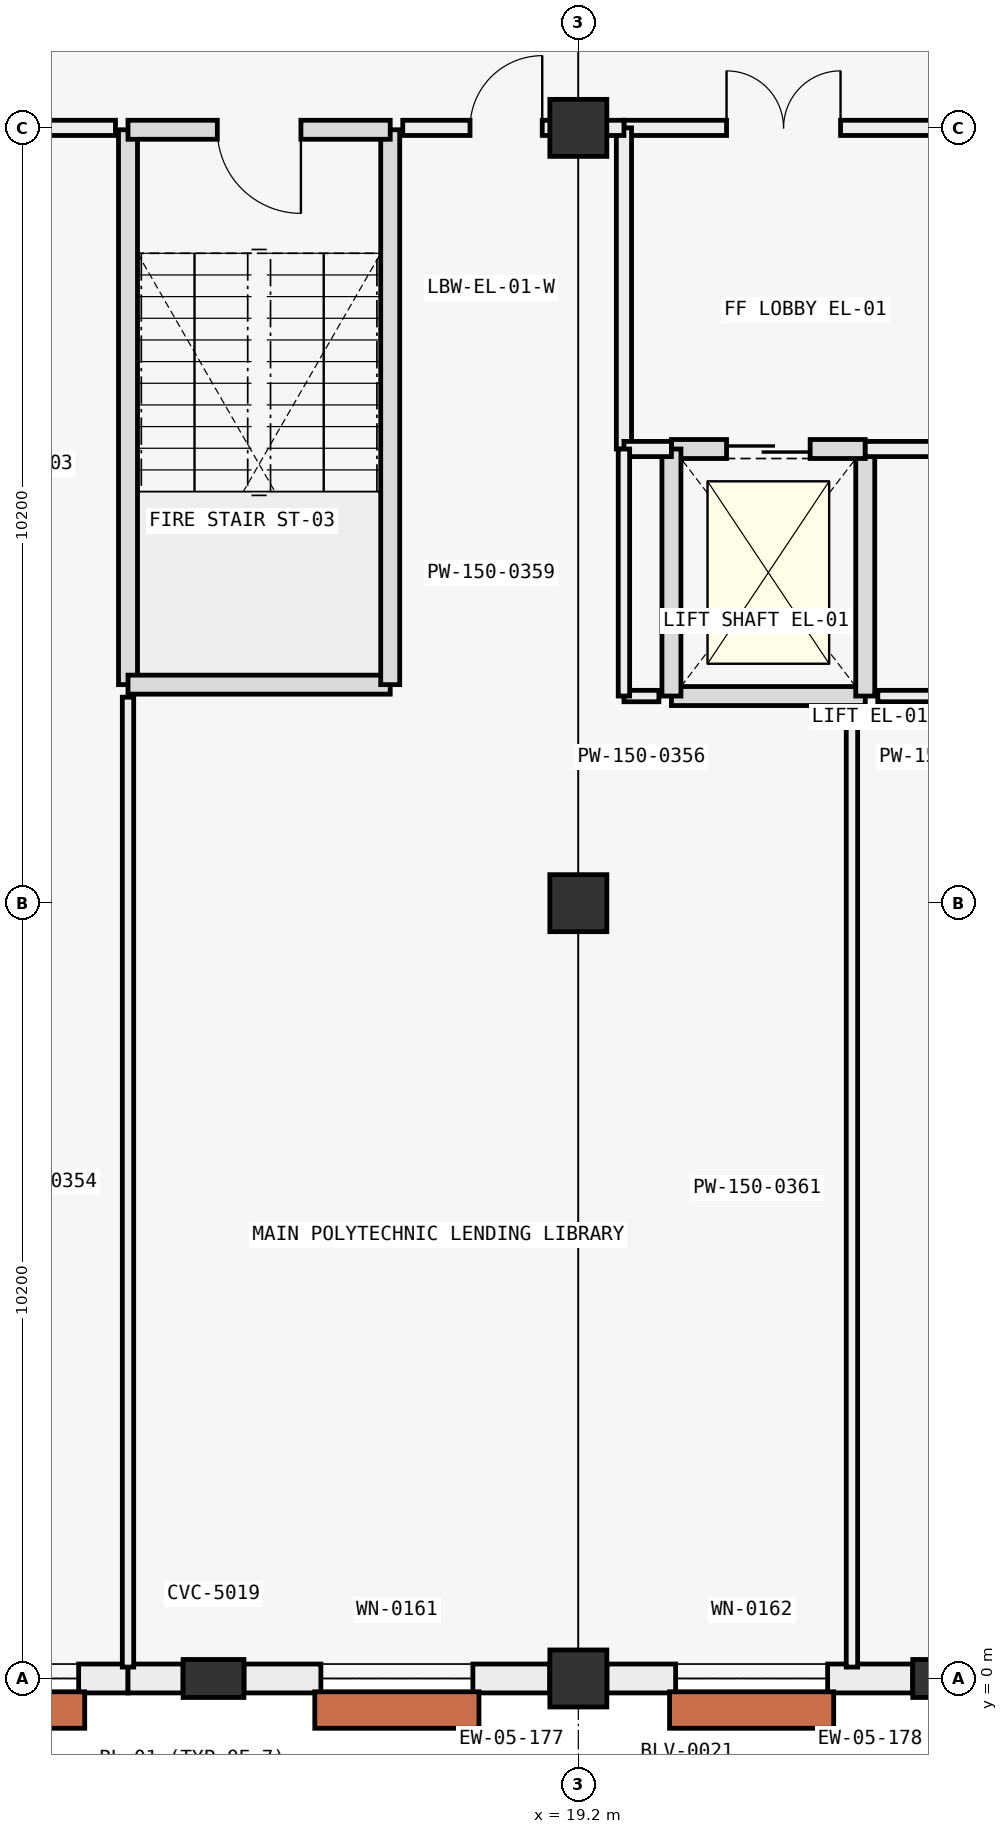
"""IFC4 building model, lengths in metres.
Left out: names, types, materials, properties, quantities, classifications, styles, units other than length and angle.
Written with IfcOpenShell. Run it as: python <this file> out.ifc"""

import sys

from ifc_helpers import new_model, si_unit, direction, frame, frame_2d, origin, origin_2d, place, context, subcontext, project, spatial, rectangle, extrude, element, fill, save


model = new_model("IFC4")
c1 = context("Model", 3, precision=1e-05, world=origin(), true_north=direction((0.0, 1.0)))
c2 = subcontext(c1, "Body", "Model", "MODEL_VIEW")
j1 = project(units=[si_unit("LENGTHUNIT", "METRE"), si_unit("PLANEANGLEUNIT", "RADIAN")], contexts=[c1])
p1 = place(None, origin())
s1 = spatial("IfcSite", under=j1, at=p1, CompositionType="ELEMENT")
p2 = place(p1, origin())
s2 = spatial("IfcBuilding", under=s1, at=p2, CompositionType="ELEMENT")
p3 = place(p2, frame((0.0, 0.0, 5.4)))
s3 = spatial("IfcBuildingStorey", under=s2, at=p3, CompositionType="ELEMENT", Elevation=5.4)
for number, where, z_axis, x_axis in (
    (1, (19.2, 0.0, 0.0), (0.0, 0.0, 1.0), (1.0, 0.0, 0.0)),
    (2, (19.2, 10.2, 0.0), (0.0, 0.0, 1.0), (1.0, 0.0, 0.0)),
    (3, (19.2, 20.4, 0.0), (0.0, 0.0, 1.0), (1.0, 0.0, 0.0)),
):
    element("IfcColumn", number, at=place(p3, frame(where, z_axis=z_axis, x_axis=x_axis)), inside=s3, PredefinedType="COLUMN", context=c2, shape_type="SweptSolid", body=[
        extrude(rectangle(XDim=0.75, YDim=0.75, at=origin_2d()), origin(), (0.0, 0.0, 1.0), 4.2),
    ])
for number, where, z_axis, x_axis in (
    (4, (14.4, 0.0, 0.0), (0.0, 0.0, 1.0), (0.0, 1.0, 0.0)),
    (5, (24.0, 0.0, 0.0), (0.0, 0.0, 1.0), (0.0, 1.0, 0.0)),
):
    element("IfcColumn", number, at=place(p3, frame(where, z_axis=z_axis, x_axis=x_axis)), inside=s3, PredefinedType="PILASTER", context=c2, shape_type="SweptSolid", body=[
        extrude(rectangle(XDim=0.5, YDim=0.8, at=origin_2d()), origin(), (0.0, 0.0, 1.0), 4.2),
    ])
p4 = place(p3, frame((13.275, 0.0, 0.0), z_axis=(0.0, 0.0, 1.0), x_axis=(-1.0, 0.0, 0.0)))
e6 = element("IfcWall", 6, at=p4, inside=s3, PredefinedType="SOLIDWALL", context=c2, shape_type="SweptSolid", body=[
    extrude(rectangle(XDim=3.299, YDim=0.38, at=frame_2d((1.649, 0.0))), origin(), (0.0, 0.0, 1.0), 3.25),
])
p5 = place(p4, frame((0.649, 0.0, 0.8)))
e7 = element("IfcOpeningElement", 7, at=p5, cuts=e6, PredefinedType="OPENING", context=c2, shape_type="SweptSolid", body=[
    extrude(rectangle(XDim=2.0, YDim=1.35, at=frame_2d((1.0, 0.675))), frame((0.0, 0.2, 0.0), z_axis=(0.0, -1.0, 0.0), x_axis=(1.0, 0.0, 0.0)), (0.0, 0.0, 1.0), 0.4),
])
p6 = place(p3, frame((13.999, 0.0, 0.0), z_axis=(0.0, 0.0, 1.0), x_axis=(-1.0, 0.0, 0.0)))
e8 = element("IfcWall", 8, at=p6, inside=s3, PredefinedType="SOLIDWALL", context=c2, shape_type="SweptSolid", body=[
    extrude(rectangle(XDim=0.724, YDim=0.38, at=frame_2d((0.362, 0.0))), origin(), (0.0, 0.0, 1.0), 3.25),
])
p7 = place(p3, frame((18.824, 0.0, 0.0), z_axis=(0.0, 0.0, 1.0), x_axis=(-1.0, 0.0, 0.0)))
e9 = element("IfcWall", 9, at=p7, inside=s3, PredefinedType="SOLIDWALL", context=c2, shape_type="SweptSolid", body=[
    extrude(rectangle(XDim=4.023, YDim=0.38, at=frame_2d((2.011, 0.0))), origin(), (0.0, 0.0, 1.0), 3.25),
])
p8 = place(p7, frame((1.011, 0.0, 0.8)))
e10 = element("IfcOpeningElement", 10, at=p8, cuts=e9, PredefinedType="OPENING", context=c2, shape_type="SweptSolid", body=[
    extrude(rectangle(XDim=2.0, YDim=1.35, at=frame_2d((1.0, 0.675))), frame((0.0, 0.2, 0.0), z_axis=(0.0, -1.0, 0.0), x_axis=(1.0, 0.0, 0.0)), (0.0, 0.0, 1.0), 0.4),
])
p9 = place(p3, frame((23.599, 0.0, 0.0), z_axis=(0.0, 0.0, 1.0), x_axis=(-1.0, 0.0, 0.0)))
e11 = element("IfcWall", 11, at=p9, inside=s3, PredefinedType="SOLIDWALL", context=c2, shape_type="SweptSolid", body=[
    extrude(rectangle(XDim=4.023, YDim=0.38, at=frame_2d((2.012, 0.0))), origin(), (0.0, 0.0, 1.0), 3.25),
])
p10 = place(p9, frame((1.119, 0.0, 0.8)))
e12 = element("IfcOpeningElement", 12, at=p10, cuts=e11, PredefinedType="OPENING", context=c2, shape_type="SweptSolid", body=[
    extrude(rectangle(XDim=2.0, YDim=1.35, at=frame_2d((1.0, 0.675))), frame((0.0, 0.2, 0.0), z_axis=(0.0, -1.0, 0.0), x_axis=(1.0, 0.0, 0.0)), (0.0, 0.0, 1.0), 0.4),
])
p11 = place(p3, frame((13.275, 20.375, 0.0), z_axis=(0.0, 0.0, 1.0), x_axis=(0.0, -1.0, 0.0)))
e13 = element("IfcWall", 13, at=p11, inside=s3, PredefinedType="SOLIDWALL", context=c2, shape_type="SweptSolid", body=[
    extrude(rectangle(XDim=7.3, YDim=0.25, at=frame_2d((3.65, 0.0))), origin(), (0.0, 0.0, 1.0), 3.92),
])
p12 = place(p3, frame((13.275, 13.075, 0.0), z_axis=(0.0, 0.0, 1.0), x_axis=(1.0, 0.0, 0.0)))
e14 = element("IfcWall", 14, at=p12, inside=s3, PredefinedType="SOLIDWALL", context=c2, shape_type="SweptSolid", body=[
    extrude(rectangle(XDim=3.45, YDim=0.25, at=frame_2d((1.725, 0.0))), origin(), (0.0, 0.0, 1.0), 3.92),
])
p13 = place(p3, frame((16.725, 13.075, 0.0), z_axis=(0.0, 0.0, 1.0), x_axis=(0.0, 1.0, 0.0)))
e15 = element("IfcWall", 15, at=p13, inside=s3, PredefinedType="SOLIDWALL", context=c2, shape_type="SweptSolid", body=[
    extrude(rectangle(XDim=7.3, YDim=0.25, at=frame_2d((3.65, 0.0))), origin(), (0.0, 0.0, 1.0), 3.92),
])
p14 = place(p3, frame((16.725, 20.375, 0.0), z_axis=(0.0, 0.0, 1.0), x_axis=(-1.0, 0.0, 0.0)))
e16 = element("IfcWall", 16, at=p14, inside=s3, PredefinedType="SOLIDWALL", context=c2, shape_type="SweptSolid", body=[
    extrude(rectangle(XDim=3.45, YDim=0.25, at=frame_2d((1.725, 0.0))), origin(), (0.0, 0.0, 1.0), 3.92),
])
p15 = place(p14, frame((1.175, 0.0, 0.0)))
e17 = element("IfcOpeningElement", 17, at=p15, cuts=e16, PredefinedType="OPENING", context=c2, shape_type="SweptSolid", body=[
    extrude(rectangle(XDim=1.1, YDim=2.2, at=frame_2d((0.55, 1.1))), frame((0.0, 0.135, 0.0), z_axis=(0.0, -1.0, 0.0), x_axis=(1.0, 0.0, 0.0)), (0.0, 0.0, 1.0), 0.27),
])
p16 = place(p3, frame((20.425, 12.925, 0.0), z_axis=(0.0, 0.0, 1.0), x_axis=(1.0, 0.0, 0.0)))
e18 = element("IfcWall", 18, at=p16, inside=s3, PredefinedType="SOLIDWALL", context=c2, shape_type="SweptSolid", body=[
    extrude(rectangle(XDim=2.55, YDim=0.25, at=frame_2d((1.275, 0.0))), origin(), (0.0, 0.0, 1.0), 3.92),
])
p17 = place(p3, frame((22.975, 12.925, 0.0), z_axis=(0.0, 0.0, 1.0), x_axis=(0.0, 1.0, 0.0)))
e19 = element("IfcWall", 19, at=p17, inside=s3, PredefinedType="SOLIDWALL", context=c2, shape_type="SweptSolid", body=[
    extrude(rectangle(XDim=3.25, YDim=0.25, at=frame_2d((1.625, 0.0))), origin(), (0.0, 0.0, 1.0), 3.92),
])
p18 = place(p3, frame((22.975, 16.175, 0.0), z_axis=(0.0, 0.0, 1.0), x_axis=(-1.0, 0.0, 0.0)))
e20 = element("IfcWall", 20, at=p18, inside=s3, PredefinedType="SOLIDWALL", context=c2, shape_type="SweptSolid", body=[
    extrude(rectangle(XDim=2.55, YDim=0.25, at=frame_2d((1.275, 0.0))), origin(), (0.0, 0.0, 1.0), 3.92),
])
p19 = place(p18, frame((0.725, 0.0, 0.0)))
e21 = element("IfcOpeningElement", 21, at=p19, cuts=e20, PredefinedType="OPENING", context=c2, shape_type="SweptSolid", body=[
    extrude(rectangle(XDim=1.1, YDim=2.1, at=frame_2d((0.55, 1.05))), frame((0.0, 0.135, 0.0), z_axis=(0.0, -1.0, 0.0), x_axis=(1.0, 0.0, 0.0)), (0.0, 0.0, 1.0), 0.27),
])
p20 = place(p3, frame((20.425, 16.175, 0.0), z_axis=(0.0, 0.0, 1.0), x_axis=(0.0, -1.0, 0.0)))
e22 = element("IfcWall", 22, at=p20, inside=s3, PredefinedType="SOLIDWALL", context=c2, shape_type="SweptSolid", body=[
    extrude(rectangle(XDim=3.25, YDim=0.25, at=frame_2d((1.625, 0.0))), origin(), (0.0, 0.0, 1.0), 3.92),
])
p21 = place(p3, frame((19.8, 20.4, 0.0), z_axis=(0.0, 0.0, 1.0), x_axis=(1.0, 0.0, 0.0)))
e23 = element("IfcWall", 23, at=p21, inside=s3, PredefinedType="PARTITIONING", context=c2, shape_type="SweptSolid", body=[
    extrude(rectangle(XDim=4.2, YDim=0.2, at=frame_2d((2.1, 0.0))), origin(), (0.0, 0.0, 1.0), 3.2),
])
p22 = place(p21, frame((1.35, 0.0, 0.0)))
e24 = element("IfcOpeningElement", 24, at=p22, cuts=e23, PredefinedType="OPENING", context=c2, shape_type="SweptSolid", body=[
    extrude(rectangle(XDim=1.5, YDim=2.2, at=frame_2d((0.75, 1.1))), frame((0.0, 0.11, 0.0), z_axis=(0.0, -1.0, 0.0), x_axis=(1.0, 0.0, 0.0)), (0.0, 0.0, 1.0), 0.22),
])
p23 = place(p3, frame((19.8, 16.175, 0.0), z_axis=(0.0, 0.0, 1.0), x_axis=(0.0, 1.0, 0.0)))
e25 = element("IfcWall", 25, at=p23, inside=s3, PredefinedType="PARTITIONING", context=c2, shape_type="SweptSolid", body=[
    extrude(rectangle(XDim=4.225, YDim=0.2, at=frame_2d((2.112, 0.0))), origin(), (0.0, 0.0, 1.0), 3.2),
])
p24 = place(p3, frame((19.8, 16.175, 0.0), z_axis=(0.0, 0.0, 1.0), x_axis=(1.0, 0.0, 0.0)))
e26 = element("IfcWall", 26, at=p24, inside=s3, PredefinedType="PARTITIONING", context=c2, shape_type="SweptSolid", body=[
    extrude(rectangle(XDim=0.625, YDim=0.2, at=frame_2d((0.312, 0.0))), origin(), (0.0, 0.0, 1.0), 3.55),
])
p25 = place(p3, frame((22.975, 16.175, 0.0), z_axis=(0.0, 0.0, 1.0), x_axis=(1.0, 0.0, 0.0)))
e27 = element("IfcWall", 27, at=p25, inside=s3, PredefinedType="PARTITIONING", context=c2, shape_type="SweptSolid", body=[
    extrude(rectangle(XDim=1.025, YDim=0.2, at=frame_2d((0.512, 0.0))), origin(), (0.0, 0.0, 1.0), 3.55),
])
p26 = place(p3, frame((13.275, 0.15, 0.0), z_axis=(0.0, 0.0, 1.0), x_axis=(0.0, 1.0, 0.0)))
e28 = element("IfcWall", 28, at=p26, inside=s3, PredefinedType="PARTITIONING", context=c2, shape_type="SweptSolid", body=[
    extrude(rectangle(XDim=12.76, YDim=0.15, at=frame_2d((6.38, 0.0))), origin(), (0.0, 0.0, 1.0), 3.2),
])
p27 = place(p3, frame((0.15, 20.4, 0.0), z_axis=(0.0, 0.0, 1.0), x_axis=(1.0, 0.0, 0.0)))
e29 = element("IfcWall", 29, at=p27, inside=s3, PredefinedType="PARTITIONING", context=c2, shape_type="SweptSolid", body=[
    extrude(rectangle(XDim=12.96, YDim=0.2, at=frame_2d((6.48, 0.0))), origin(), (0.0, 0.0, 1.0), 3.2),
])
p28 = place(p27, frame((6.05, 0.0, 0.0)))
e30 = element("IfcOpeningElement", 30, at=p28, cuts=e29, PredefinedType="OPENING", context=c2, shape_type="SweptSolid", body=[
    extrude(rectangle(XDim=1.4, YDim=2.2, at=frame_2d((0.7, 1.1))), frame((0.0, 0.11, 0.0), z_axis=(0.0, -1.0, 0.0), x_axis=(1.0, 0.0, 0.0)), (0.0, 0.0, 1.0), 0.22),
])
p29 = place(p3, frame((19.8, 12.925, 0.0), z_axis=(0.0, 0.0, 1.0), x_axis=(1.0, 0.0, 0.0)))
e31 = element("IfcWall", 31, at=p29, inside=s3, PredefinedType="PARTITIONING", context=c2, shape_type="SweptSolid", body=[
    extrude(rectangle(XDim=0.46, YDim=0.15, at=frame_2d((0.23, 0.0))), origin(), (0.0, 0.0, 1.0), 3.85),
])
p30 = place(p3, frame((23.14, 12.925, 0.0), z_axis=(0.0, 0.0, 1.0), x_axis=(1.0, 0.0, 0.0)))
e32 = element("IfcWall", 32, at=p30, inside=s3, PredefinedType="PARTITIONING", context=c2, shape_type="SweptSolid", body=[
    extrude(rectangle(XDim=1.72, YDim=0.15, at=frame_2d((0.86, 0.0))), origin(), (0.0, 0.0, 1.0), 3.85),
])
p31 = place(p3, frame((19.8, 12.925, 0.0), z_axis=(0.0, 0.0, 1.0), x_axis=(0.0, 1.0, 0.0)))
e33 = element("IfcWall", 33, at=p31, inside=s3, PredefinedType="PARTITIONING", context=c2, shape_type="SweptSolid", body=[
    extrude(rectangle(XDim=3.25, YDim=0.15, at=frame_2d((1.625, 0.0))), origin(), (0.0, 0.0, 1.0), 3.85),
])
p32 = place(p3, frame((16.89, 20.4, 0.0), z_axis=(0.0, 0.0, 1.0), x_axis=(1.0, 0.0, 0.0)))
e34 = element("IfcWall", 34, at=p32, inside=s3, PredefinedType="PARTITIONING", context=c2, shape_type="SweptSolid", body=[
    extrude(rectangle(XDim=2.91, YDim=0.2, at=frame_2d((1.455, 0.0))), origin(), (0.0, 0.0, 1.0), 3.2),
])
p33 = place(p32, frame((0.885, 0.0, 0.0)))
e35 = element("IfcOpeningElement", 35, at=p33, cuts=e34, PredefinedType="OPENING", context=c2, shape_type="SweptSolid", body=[
    extrude(rectangle(XDim=0.95, YDim=2.1, at=frame_2d((0.475, 1.05))), frame((0.0, 0.11, 0.0), z_axis=(0.0, -1.0, 0.0), x_axis=(1.0, 0.0, 0.0)), (0.0, 0.0, 1.0), 0.22),
])
p34 = place(p3, frame((22.8, 0.15, 0.0), z_axis=(0.0, 0.0, 1.0), x_axis=(0.0, 1.0, 0.0)))
e36 = element("IfcWall", 36, at=p34, inside=s3, PredefinedType="PARTITIONING", context=c2, shape_type="SweptSolid", body=[
    extrude(rectangle(XDim=12.61, YDim=0.15, at=frame_2d((6.305, 0.0))), origin(), (0.0, 0.0, 1.0), 3.2),
])
p35 = place(p5, origin())
e37 = element("IfcWindow", 37, at=p35, inside=s3, PartitioningType="SINGLE_PANEL", PredefinedType="WINDOW", context=c2, shape_type="SweptSolid", body=[
    extrude(rectangle(XDim=2.0, YDim=1.35, at=frame_2d((1.0, 0.675))), frame((0.0, 0.03, 0.0), z_axis=(0.0, -1.0, 0.0), x_axis=(1.0, 0.0, 0.0)), (0.0, 0.0, 1.0), 0.06),
])
fill(e7, e37)
p36 = place(p8, origin())
e38 = element("IfcWindow", 38, at=p36, inside=s3, PartitioningType="SINGLE_PANEL", PredefinedType="WINDOW", context=c2, shape_type="SweptSolid", body=[
    extrude(rectangle(XDim=2.0, YDim=1.35, at=frame_2d((1.0, 0.675))), frame((0.0, 0.03, 0.0), z_axis=(0.0, -1.0, 0.0), x_axis=(1.0, 0.0, 0.0)), (0.0, 0.0, 1.0), 0.06),
])
fill(e10, e38)
p37 = place(p10, origin())
e39 = element("IfcWindow", 39, at=p37, inside=s3, PartitioningType="SINGLE_PANEL", PredefinedType="WINDOW", context=c2, shape_type="SweptSolid", body=[
    extrude(rectangle(XDim=2.0, YDim=1.35, at=frame_2d((1.0, 0.675))), frame((0.0, 0.03, 0.0), z_axis=(0.0, -1.0, 0.0), x_axis=(1.0, 0.0, 0.0)), (0.0, 0.0, 1.0), 0.06),
])
fill(e12, e39)
p38 = place(p15, origin())
e40 = element("IfcDoor", 40, at=p38, inside=s3, OperationType="SINGLE_SWING_LEFT", PredefinedType="DOOR", context=c2, shape_type="SweptSolid", body=[
    extrude(rectangle(XDim=1.1, YDim=2.2, at=frame_2d((0.55, 1.1))), frame((0.0, 0.025, 0.0), z_axis=(0.0, -1.0, 0.0), x_axis=(1.0, 0.0, 0.0)), (0.0, 0.0, 1.0), 0.05),
])
fill(e17, e40)
p39 = place(p19, origin())
e41 = element("IfcDoor", 41, at=p39, inside=s3, OperationType="SLIDING_TO_LEFT", PredefinedType="DOOR", context=c2, shape_type="SweptSolid", body=[
    extrude(rectangle(XDim=1.1, YDim=2.1, at=frame_2d((0.55, 1.05))), frame((0.0, 0.025, 0.0), z_axis=(0.0, -1.0, 0.0), x_axis=(1.0, 0.0, 0.0)), (0.0, 0.0, 1.0), 0.05),
])
fill(e21, e41)
p40 = place(p22, origin())
e42 = element("IfcDoor", 42, at=p40, inside=s3, OperationType="SINGLE_SWING_LEFT", PredefinedType="DOOR", context=c2, shape_type="SweptSolid", body=[
    extrude(rectangle(XDim=1.5, YDim=2.2, at=frame_2d((0.75, 1.1))), frame((0.0, 0.025, 0.0), z_axis=(0.0, -1.0, 0.0), x_axis=(1.0, 0.0, 0.0)), (0.0, 0.0, 1.0), 0.05),
])
fill(e24, e42)
p41 = place(p33, origin())
e43 = element("IfcDoor", 43, at=p41, inside=s3, OperationType="SINGLE_SWING_RIGHT", PredefinedType="DOOR", context=c2, shape_type="SweptSolid", body=[
    extrude(rectangle(XDim=0.95, YDim=2.1, at=frame_2d((0.475, 1.05))), frame((0.0, 0.025, 0.0), z_axis=(0.0, -1.0, 0.0), x_axis=(1.0, 0.0, 0.0)), (0.0, 0.0, 1.0), 0.05),
])
fill(e35, e43)
save(model, sys.argv[1])
